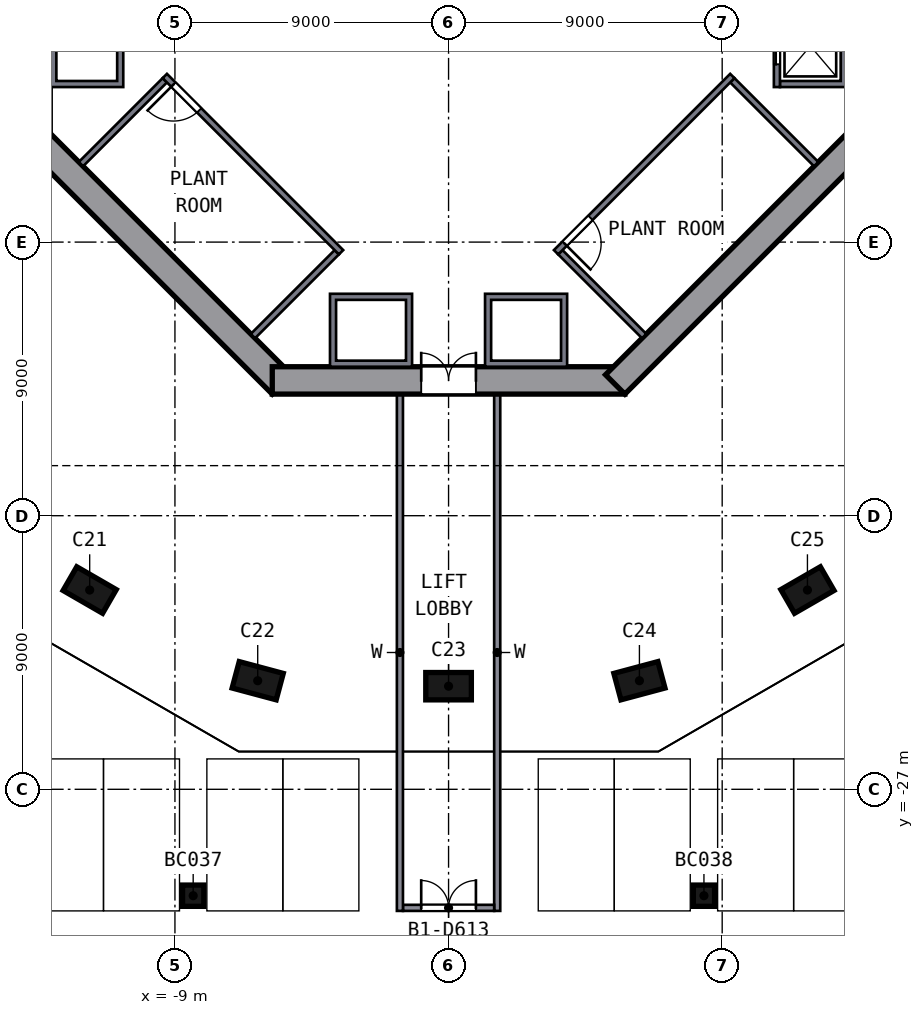
"""IFC4 building model, lengths in metres.
Left out: names, types, materials, properties, quantities, classifications, styles, units other than length and angle.
Written with IfcOpenShell. Run it as: python <this file> out.ifc"""

import sys

from ifc_helpers import new_model, si_unit, direction, frame, frame_2d, origin, origin_2d, place, context, subcontext, project, spatial, polyline, rectangle, outline, extrude, element, fill, save


model = new_model("IFC4")
c1 = context("Model", 3, precision=1e-05, world=origin(), true_north=direction((0.0, 1.0)))
c2 = subcontext(c1, "Body", "Model", "MODEL_VIEW")
j1 = project(units=[si_unit("LENGTHUNIT", "METRE"), si_unit("PLANEANGLEUNIT", "RADIAN")], contexts=[c1])
p1 = place(None, origin())
s1 = spatial("IfcSite", under=j1, at=p1, CompositionType="ELEMENT")
p2 = place(p1, origin())
s2 = spatial("IfcBuilding", under=s1, at=p2, CompositionType="ELEMENT")
p3 = place(p2, frame((0.0, 0.0, -3.9)))
s3 = spatial("IfcBuildingStorey", under=s2, at=p3, CompositionType="ELEMENT", Elevation=-3.9)
for number, where, z_axis, x_axis in (
    (1, (-11.804, -20.445, 0.0), (0.0, 0.0, 1.0), (0.866, -0.5, 0.0)),
    (2, (-6.278, -23.428, 0.0), (0.0, 0.0, 1.0), (-0.966, 0.259, 0.0)),
    (3, (0.0, -23.608, 0.0), (0.0, 0.0, 1.0), (1.0, 0.0, 0.0)),
    (4, (6.278, -23.428, 0.0), (0.0, 0.0, 1.0), (-0.966, -0.259, 0.0)),
    (5, (11.804, -20.445, 0.0), (0.0, 0.0, 1.0), (0.866, 0.5, 0.0)),
):
    element("IfcColumn", number, at=place(p3, frame(where, z_axis=z_axis, x_axis=x_axis)), inside=s3, PredefinedType="COLUMN", context=c2, shape_type="SweptSolid", body=[
        extrude(rectangle(XDim=1.5, YDim=0.9, at=origin_2d()), origin(), (0.0, 0.0, 1.0), 3.45),
    ])
p4 = place(p3, frame((-13.682, -5.481, 0.0), z_axis=(0.0, 0.0, 1.0), x_axis=(0.707106781, -0.707106781, 0.0)))
e6 = element("IfcWall", 6, at=p4, inside=s3, PredefinedType="SHEAR", context=c2, shape_type="SweptSolid", body=[
    extrude(rectangle(XDim=11.598, YDim=0.9, at=frame_2d((5.799, 0.0))), origin(), (0.0, 0.0, 1.0), 3.9),
])
p5 = place(p3, frame((-5.799, -13.55, 0.0), z_axis=(0.0, 0.0, 1.0), x_axis=(1.0, 0.0, 0.0)))
e7 = element("IfcWall", 7, at=p5, inside=s3, PredefinedType="SHEAR", context=c2, shape_type="SweptSolid", body=[
    extrude(rectangle(XDim=11.598, YDim=0.9, at=frame_2d((5.799, 0.0))), origin(), (0.0, 0.0, 1.0), 3.9),
])
p6 = place(p5, frame((4.899, 0.0, 0.0)))
e8 = element("IfcOpeningElement", 8, at=p6, cuts=e7, PredefinedType="OPENING", context=c2, shape_type="SweptSolid", body=[
    extrude(rectangle(XDim=1.8, YDim=2.1, at=frame_2d((0.9, 1.05))), frame((0.0, 0.46, 0.0), z_axis=(0.0, -1.0, 0.0), x_axis=(1.0, 0.0, 0.0)), (0.0, 0.0, 1.0), 0.92),
])
p7 = place(p3, frame((5.481, -13.682, 0.0), z_axis=(0.0, 0.0, 1.0), x_axis=(0.707106781, 0.707106781, 0.0)))
e9 = element("IfcWall", 9, at=p7, inside=s3, PredefinedType="SHEAR", context=c2, shape_type="SweptSolid", body=[
    extrude(rectangle(XDim=11.598, YDim=0.9, at=frame_2d((5.799, 0.0))), origin(), (0.0, 0.0, 1.0), 3.9),
])
for number, where, z_axis, x_axis in (
    (10, (-8.4, -30.5, 0.0), (0.0, 0.0, 1.0), (1.0, 0.0, 0.0)),
    (11, (8.4, -30.5, 0.0), (0.0, 0.0, 1.0), (1.0, 0.0, 0.0)),
):
    element("IfcColumn", number, at=place(p3, frame(where, z_axis=z_axis, x_axis=x_axis)), inside=s3, PredefinedType="COLUMN", context=c2, shape_type="SweptSolid", body=[
        extrude(rectangle(XDim=0.7, YDim=0.7, at=origin_2d()), origin(), (0.0, 0.0, 1.0), 3.84),
    ])
p8 = place(p3, origin())
e12 = element("IfcWall", 12, at=p8, inside=s3, PredefinedType="SOLIDWALL", context=c2, shape_type="SweptSolid", body=[
    extrude(outline(polyline([(13.1, -3.9), (10.9, -3.9), (10.9, -3.7), (12.9, -3.7), (12.9, -1.4), (10.9, -1.4), (10.9, -1.2), (13.1, -1.2), (13.1, -3.9)])), origin(), (0.0, 0.0, 1.0), 3.45),
])
p9 = place(p3, frame((10.8, -1.2, 0.0), z_axis=(0.0, 0.0, 1.0), x_axis=(0.0, -1.0, 0.0)))
e13 = element("IfcWall", 13, at=p9, inside=s3, PredefinedType="SOLIDWALL", context=c2, shape_type="SweptSolid", body=[
    extrude(rectangle(XDim=2.7, YDim=0.2, at=frame_2d((1.35, 0.0))), origin(), (0.0, 0.0, 1.0), 3.45),
])
p10 = place(p9, frame((0.75, 0.0, 0.0)))
e14 = element("IfcOpeningElement", 14, at=p10, cuts=e13, PredefinedType="OPENING", context=c2, shape_type="SweptSolid", body=[
    extrude(rectangle(XDim=1.2, YDim=2.1, at=frame_2d((0.6, 1.05))), frame((0.0, 0.11, 0.0), z_axis=(0.0, -1.0, 0.0), x_axis=(1.0, 0.0, 0.0)), (0.0, 0.0, 1.0), 0.22),
])
p11 = place(p3, origin())
e15 = element("IfcWall", 15, at=p11, inside=s3, PredefinedType="SOLIDWALL", context=c2, shape_type="SweptSolid", body=[
    extrude(outline(polyline([(-10.7, -3.9), (-13.1, -3.9), (-13.1, -1.2), (-10.7, -1.2), (-10.7, -3.9)]), holes=[polyline([(-12.9, -1.4), (-12.9, -3.7), (-10.9, -3.7), (-10.9, -1.4), (-12.9, -1.4)])]), origin(), (0.0, 0.0, 1.0), 3.45),
])
p12 = place(p3, origin())
e16 = element("IfcWall", 16, at=p12, inside=s3, PredefinedType="SOLIDWALL", context=c2, shape_type="SweptSolid", body=[
    extrude(outline(polyline([(-1.2, -13.1), (-3.9, -13.1), (-3.9, -10.7), (-1.2, -10.7), (-1.2, -13.1)]), holes=[polyline([(-3.7, -10.9), (-3.7, -12.9), (-1.4, -12.9), (-1.4, -10.9), (-3.7, -10.9)])]), origin(), (0.0, 0.0, 1.0), 3.45),
])
p13 = place(p3, origin())
e17 = element("IfcWall", 17, at=p13, inside=s3, PredefinedType="SOLIDWALL", context=c2, shape_type="SweptSolid", body=[
    extrude(outline(polyline([(3.9, -10.7), (3.9, -13.1), (1.2, -13.1), (1.2, -10.7), (3.9, -10.7)]), holes=[polyline([(1.4, -12.9), (3.7, -12.9), (3.7, -10.9), (1.4, -10.9), (1.4, -12.9)])]), origin(), (0.0, 0.0, 1.0), 3.45),
])
p14 = place(p3, frame((-3.535, -9.334, 0.0), z_axis=(0.0, 0.0, 1.0), x_axis=(-0.707106781, 0.707106781, 0.0)))
e18 = element("IfcWall", 18, at=p14, inside=s3, PredefinedType="SOLIDWALL", context=c2, shape_type="SweptSolid", body=[
    extrude(rectangle(XDim=8.2, YDim=0.2, at=frame_2d((4.1, 0.0))), origin(), (0.0, 0.0, 1.0), 3.45),
])
p15 = place(p14, frame((6.6, 0.0, 0.0)))
e19 = element("IfcOpeningElement", 19, at=p15, cuts=e18, PredefinedType="OPENING", context=c2, shape_type="SweptSolid", body=[
    extrude(rectangle(XDim=1.2, YDim=2.1, at=frame_2d((0.6, 1.05))), frame((0.0, 0.11, 0.0), z_axis=(0.0, -1.0, 0.0), x_axis=(1.0, 0.0, 0.0)), (0.0, 0.0, 1.0), 0.22),
])
for number, where, z_axis, x_axis in (
    (20, (-9.334, -3.677, 0.0), (0.0, 0.0, 1.0), (-0.707, -0.707, 0.0)),
    (21, (-3.677, -9.334, 0.0), (0.0, 0.0, 1.0), (-0.707, -0.707, 0.0)),
):
    element("IfcWall", number, at=place(p3, frame(where, z_axis=z_axis, x_axis=x_axis)), inside=s3, PredefinedType="SOLIDWALL", context=c2, shape_type="SweptSolid", body=[
        extrude(rectangle(XDim=3.9, YDim=0.2, at=frame_2d((1.95, 0.0))), origin(), (0.0, 0.0, 1.0), 3.45),
    ])
p16 = place(p3, frame((9.334, -3.535, 0.0), z_axis=(0.0, 0.0, 1.0), x_axis=(-0.707106781, -0.707106781, 0.0)))
e22 = element("IfcWall", 22, at=p16, inside=s3, PredefinedType="SOLIDWALL", context=c2, shape_type="SweptSolid", body=[
    extrude(rectangle(XDim=8.2, YDim=0.2, at=frame_2d((4.1, 0.0))), origin(), (0.0, 0.0, 1.0), 3.45),
])
p17 = place(p16, frame((6.6, 0.0, 0.0)))
e23 = element("IfcOpeningElement", 23, at=p17, cuts=e22, PredefinedType="OPENING", context=c2, shape_type="SweptSolid", body=[
    extrude(rectangle(XDim=1.2, YDim=2.1, at=frame_2d((0.6, 1.05))), frame((0.0, 0.11, 0.0), z_axis=(0.0, -1.0, 0.0), x_axis=(1.0, 0.0, 0.0)), (0.0, 0.0, 1.0), 0.22),
])
for number, where, z_axis, x_axis in (
    (24, (3.677, -9.334, 0.0), (0.0, 0.0, 1.0), (0.707, -0.707, 0.0)),
    (25, (9.334, -3.677, 0.0), (0.0, 0.0, 1.0), (0.707, -0.707, 0.0)),
):
    element("IfcWall", number, at=place(p3, frame(where, z_axis=z_axis, x_axis=x_axis)), inside=s3, PredefinedType="SOLIDWALL", context=c2, shape_type="SweptSolid", body=[
        extrude(rectangle(XDim=3.9, YDim=0.2, at=frame_2d((1.95, 0.0))), origin(), (0.0, 0.0, 1.0), 3.45),
    ])
for number, where, z_axis, x_axis in (
    (26, (-1.6, -31.0, 0.0), (0.0, 0.0, 1.0), (0.0, 1.0, 0.0)),
    (27, (1.6, -31.0, 0.0), (0.0, 0.0, 1.0), (0.0, 1.0, 0.0)),
):
    element("IfcWall", number, at=place(p3, frame(where, z_axis=z_axis, x_axis=x_axis)), inside=s3, PredefinedType="PARTITIONING", context=c2, shape_type="SweptSolid", body=[
        extrude(rectangle(XDim=17.0, YDim=0.2, at=frame_2d((8.5, 0.0))), origin(), (0.0, 0.0, 1.0), 3.3),
    ])
p18 = place(p3, frame((-1.5, -30.9, 0.0), z_axis=(0.0, 0.0, 1.0), x_axis=(1.0, 0.0, 0.0)))
e28 = element("IfcWall", 28, at=p18, inside=s3, PredefinedType="PARTITIONING", context=c2, shape_type="SweptSolid", body=[
    extrude(rectangle(XDim=3.0, YDim=0.2, at=frame_2d((1.5, 0.0))), origin(), (0.0, 0.0, 1.0), 3.3),
])
p19 = place(p18, frame((0.6, 0.0, 0.0)))
e29 = element("IfcOpeningElement", 29, at=p19, cuts=e28, PredefinedType="OPENING", context=c2, shape_type="SweptSolid", body=[
    extrude(rectangle(XDim=1.8, YDim=2.1, at=frame_2d((0.9, 1.05))), frame((0.0, 0.11, 0.0), z_axis=(0.0, -1.0, 0.0), x_axis=(1.0, 0.0, 0.0)), (0.0, 0.0, 1.0), 0.22),
])
p20 = place(p10, origin())
e30 = element("IfcDoor", 30, at=p20, inside=s3, OperationType="DOUBLE_DOOR_SLIDING", PredefinedType="DOOR", context=c2, shape_type="SweptSolid", body=[
    extrude(rectangle(XDim=1.2, YDim=2.1, at=frame_2d((0.6, 1.05))), frame((0.0, 0.025, 0.0), z_axis=(0.0, -1.0, 0.0), x_axis=(1.0, 0.0, 0.0)), (0.0, 0.0, 1.0), 0.05),
])
fill(e14, e30)
p21 = place(p15, origin())
e31 = element("IfcDoor", 31, at=p21, inside=s3, OperationType="SINGLE_SWING_RIGHT", PredefinedType="DOOR", context=c2, shape_type="SweptSolid", body=[
    extrude(rectangle(XDim=1.2, YDim=2.1, at=frame_2d((0.6, 1.05))), frame((0.0, 0.025, 0.0), z_axis=(0.0, -1.0, 0.0), x_axis=(1.0, 0.0, 0.0)), (0.0, 0.0, 1.0), 0.05),
])
fill(e19, e31)
p22 = place(p17, origin())
e32 = element("IfcDoor", 32, at=p22, inside=s3, OperationType="SINGLE_SWING_RIGHT", PredefinedType="DOOR", context=c2, shape_type="SweptSolid", body=[
    extrude(rectangle(XDim=1.2, YDim=2.1, at=frame_2d((0.6, 1.05))), frame((0.0, 0.025, 0.0), z_axis=(0.0, -1.0, 0.0), x_axis=(1.0, 0.0, 0.0)), (0.0, 0.0, 1.0), 0.05),
])
fill(e23, e32)
p23 = place(p6, origin())
e33 = element("IfcDoor", 33, at=p23, inside=s3, OperationType="DOUBLE_DOOR_SINGLE_SWING", PredefinedType="DOOR", context=c2, shape_type="SweptSolid", body=[
    extrude(rectangle(XDim=1.8, YDim=2.1, at=frame_2d((0.9, 1.05))), frame((0.0, 0.025, 0.0), z_axis=(0.0, -1.0, 0.0), x_axis=(1.0, 0.0, 0.0)), (0.0, 0.0, 1.0), 0.05),
])
fill(e8, e33)
p24 = place(p19, origin())
e34 = element("IfcDoor", 34, at=p24, inside=s3, OperationType="DOUBLE_DOOR_SINGLE_SWING", PredefinedType="DOOR", context=c2, shape_type="SweptSolid", body=[
    extrude(rectangle(XDim=1.8, YDim=2.1, at=frame_2d((0.9, 1.05))), frame((0.0, 0.025, 0.0), z_axis=(0.0, -1.0, 0.0), x_axis=(1.0, 0.0, 0.0)), (0.0, 0.0, 1.0), 0.05),
])
fill(e29, e34)
save(model, sys.argv[1])
